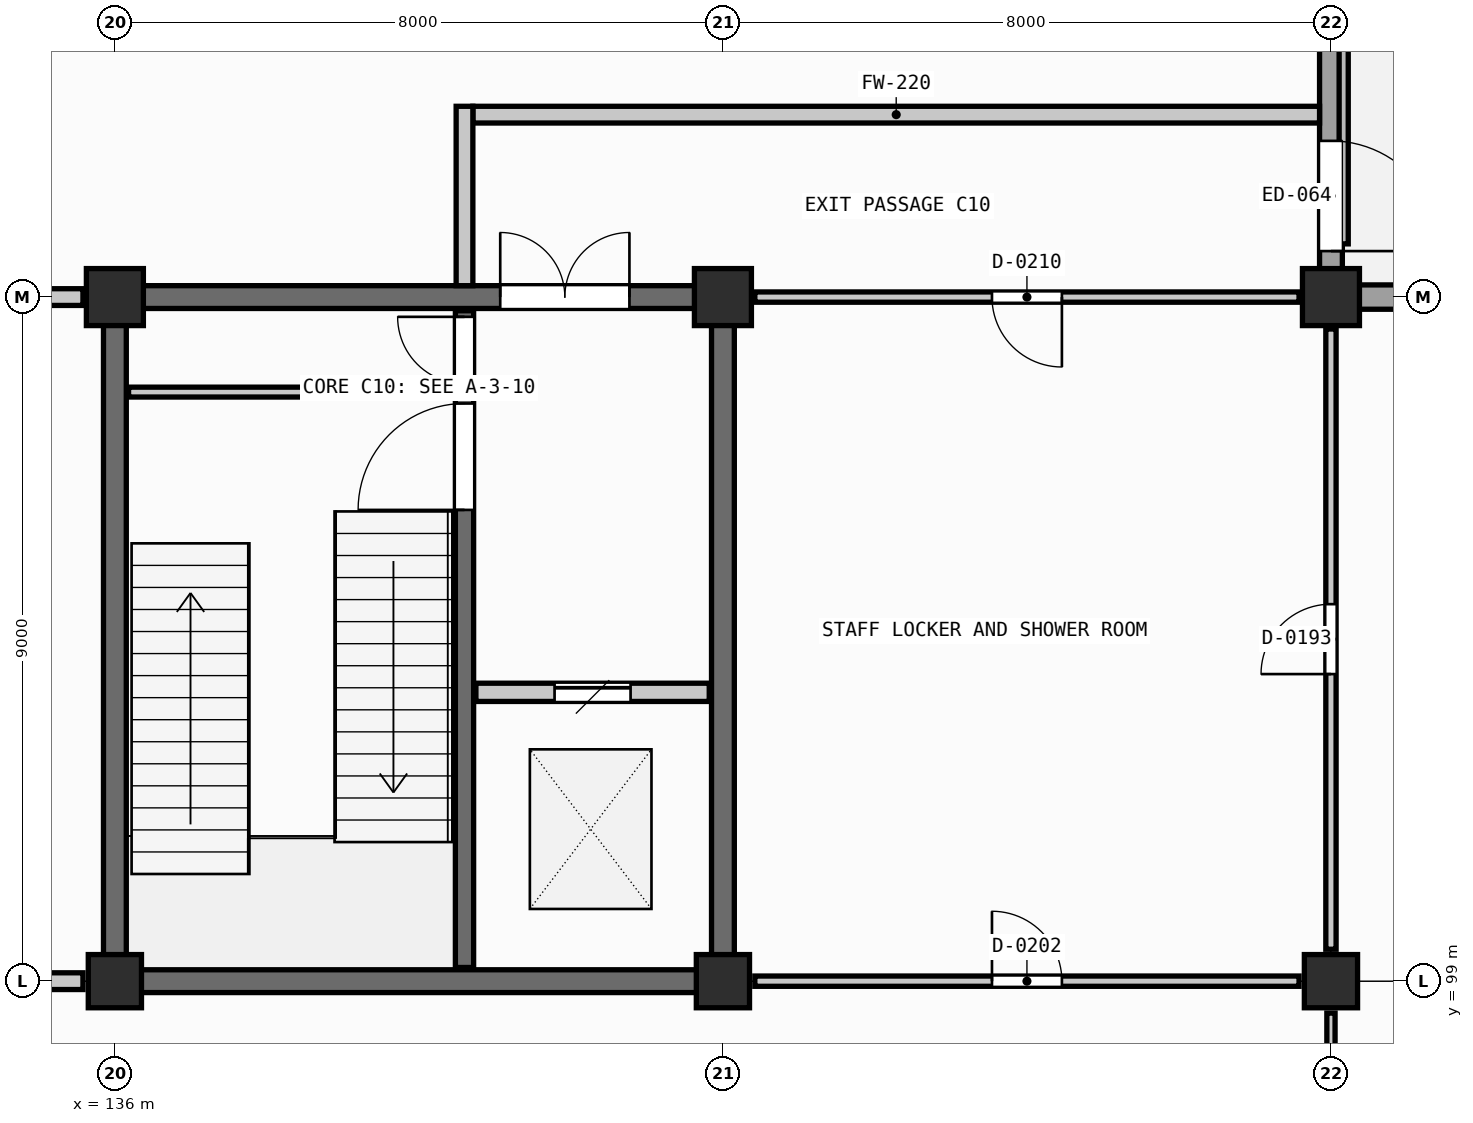
"""IFC4 building model, lengths in metres.
Left out: names, types, materials, properties, quantities, classifications, styles, units other than length and angle.
Written with IfcOpenShell. Run it as: python <this file> out.ifc"""

import sys

from ifc_helpers import new_model, si_unit, direction, frame, frame_2d, origin, origin_2d, place, context, subcontext, project, spatial, rectangle, extrude, element, fill, save


model = new_model("IFC4")
c1 = context("Model", 3, precision=1e-05, world=origin(), true_north=direction((0.0, 1.0)))
c2 = subcontext(c1, "Body", "Model", "MODEL_VIEW")
j1 = project(units=[si_unit("LENGTHUNIT", "METRE"), si_unit("PLANEANGLEUNIT", "RADIAN")], contexts=[c1])
p1 = place(None, origin())
s1 = spatial("IfcSite", under=j1, at=p1, CompositionType="ELEMENT")
p2 = place(p1, origin())
s2 = spatial("IfcBuilding", under=s1, at=p2, CompositionType="ELEMENT")
p3 = place(p2, origin())
s3 = spatial("IfcBuildingStorey", under=s2, at=p3, CompositionType="ELEMENT", Elevation=0.0)
p4 = place(p3, frame((136.0, 99.0, -1.25), z_axis=(0.0, 0.0, 1.0), x_axis=(1.0, 0.0, 0.0)))
e1 = element("IfcColumn", 1, at=p4, inside=s3, PredefinedType="COLUMN", context=c2, shape_type="SweptSolid", body=[
    extrude(rectangle(XDim=0.7, YDim=0.7, at=origin_2d()), origin(), (0.0, 0.0, 1.0), 6.05),
])
p5 = place(p3, frame((136.0, 108.0, -1.25), z_axis=(0.0, 0.0, 1.0), x_axis=(1.0, 0.0, 0.0)))
e2 = element("IfcColumn", 2, at=p5, inside=s3, PredefinedType="COLUMN", context=c2, shape_type="SweptSolid", body=[
    extrude(rectangle(XDim=0.75, YDim=0.75, at=origin_2d()), origin(), (0.0, 0.0, 1.0), 6.05),
])
p6 = place(p3, frame((144.0, 99.0, -1.25), z_axis=(0.0, 0.0, 1.0), x_axis=(1.0, 0.0, 0.0)))
e3 = element("IfcColumn", 3, at=p6, inside=s3, PredefinedType="COLUMN", context=c2, shape_type="SweptSolid", body=[
    extrude(rectangle(XDim=0.7, YDim=0.7, at=origin_2d()), origin(), (0.0, 0.0, 1.0), 6.05),
])
p7 = place(p3, frame((144.0, 108.0, -1.25), z_axis=(0.0, 0.0, 1.0), x_axis=(1.0, 0.0, 0.0)))
e4 = element("IfcColumn", 4, at=p7, inside=s3, PredefinedType="COLUMN", context=c2, shape_type="SweptSolid", body=[
    extrude(rectangle(XDim=0.75, YDim=0.75, at=origin_2d()), origin(), (0.0, 0.0, 1.0), 6.05),
])
p8 = place(p3, frame((152.0, 99.0, -1.25), z_axis=(0.0, 0.0, 1.0), x_axis=(1.0, 0.0, 0.0)))
e5 = element("IfcColumn", 5, at=p8, inside=s3, PredefinedType="COLUMN", context=c2, shape_type="SweptSolid", body=[
    extrude(rectangle(XDim=0.7, YDim=0.7, at=origin_2d()), origin(), (0.0, 0.0, 1.0), 6.05),
])
p9 = place(p3, frame((152.0, 108.0, -1.25), z_axis=(0.0, 0.0, 1.0), x_axis=(1.0, 0.0, 0.0)))
e6 = element("IfcColumn", 6, at=p9, inside=s3, PredefinedType="COLUMN", context=c2, shape_type="SweptSolid", body=[
    extrude(rectangle(XDim=0.75, YDim=0.75, at=origin_2d()), origin(), (0.0, 0.0, 1.0), 6.05),
])
p10 = place(p3, frame((159.655, 108.0, 0.0), z_axis=(0.0, 0.0, 1.0), x_axis=(-1.0, 0.0, 0.0)))
e7 = element("IfcWall", 7, at=p10, inside=s3, PredefinedType="SOLIDWALL", context=c2, shape_type="SweptSolid", body=[
    extrude(rectangle(XDim=7.285, YDim=0.32, at=frame_2d((3.643, 0.0))), origin(), (0.0, 0.0, 1.0), 3.65),
])
p11 = place(p10, frame((2.542, 0.0, 0.0)))
e8 = element("IfcOpeningElement", 8, at=p11, cuts=e7, PredefinedType="OPENING", context=c2, shape_type="SweptSolid", body=[
    extrude(rectangle(XDim=2.2, YDim=2.3, at=frame_2d((1.1, 1.15))), frame((0.0, 0.17, 0.0), z_axis=(0.0, -1.0, 0.0), x_axis=(1.0, 0.0, 0.0)), (0.0, 0.0, 1.0), 0.34),
])
p12 = place(p3, frame((152.0, 108.37, 0.0), z_axis=(0.0, 0.0, 1.0), x_axis=(0.0, 1.0, 0.0)))
e9 = element("IfcWall", 9, at=p12, inside=s3, PredefinedType="SOLIDWALL", context=c2, shape_type="SweptSolid", body=[
    extrude(rectangle(XDim=8.285, YDim=0.3, at=frame_2d((4.143, 0.0))), origin(), (0.0, 0.0, 1.0), 3.65),
])
p13 = place(p12, frame((3.417, 0.0, 0.0)))
e10 = element("IfcOpeningElement", 10, at=p13, cuts=e9, PredefinedType="OPENING", context=c2, shape_type="SweptSolid", body=[
    extrude(rectangle(XDim=1.45, YDim=2.2, at=frame_2d((0.725, 1.1))), frame((0.0, 0.16, 0.0), z_axis=(0.0, -1.0, 0.0), x_axis=(1.0, 0.0, 0.0)), (0.0, 0.0, 1.0), 0.32),
])
p14 = place(p12, frame((0.235, 0.0, 0.0)))
e11 = element("IfcOpeningElement", 11, at=p14, cuts=e9, PredefinedType="OPENING", context=c2, shape_type="SweptSolid", body=[
    extrude(rectangle(XDim=1.45, YDim=2.2, at=frame_2d((0.725, 1.1))), frame((0.0, 0.16, 0.0), z_axis=(0.0, -1.0, 0.0), x_axis=(1.0, 0.0, 0.0)), (0.0, 0.0, 1.0), 0.32),
])
p15 = place(p3, frame((136.345, 99.0, -1.25), z_axis=(0.0, 0.0, 1.0), x_axis=(1.0, 0.0, 0.0)))
e12 = element("IfcWall", 12, at=p15, inside=s3, PredefinedType="SHEAR", context=c2, shape_type="SweptSolid", body=[
    extrude(rectangle(XDim=7.31, YDim=0.3, at=frame_2d((3.655, 0.0))), origin(), (0.0, 0.0, 1.0), 5.805),
])
p16 = place(p3, frame((136.37, 108.0, -1.25), z_axis=(0.0, 0.0, 1.0), x_axis=(1.0, 0.0, 0.0)))
e13 = element("IfcWall", 13, at=p16, inside=s3, PredefinedType="SHEAR", context=c2, shape_type="SweptSolid", body=[
    extrude(rectangle(XDim=7.26, YDim=0.3, at=frame_2d((3.63, 0.0))), origin(), (0.0, 0.0, 1.0), 5.805),
])
p17 = place(p16, frame((4.7, 0.0, 1.25)))
e14 = element("IfcOpeningElement", 14, at=p17, cuts=e13, PredefinedType="OPENING", context=c2, shape_type="SweptSolid", body=[
    extrude(rectangle(XDim=1.7, YDim=2.25, at=frame_2d((0.85, 1.125))), frame((0.0, 0.16, 0.0), z_axis=(0.0, -1.0, 0.0), x_axis=(1.0, 0.0, 0.0)), (0.0, 0.0, 1.0), 0.32),
])
for number, where, z_axis, x_axis in (
    (15, (136.0, 99.345, -1.25), (0.0, 0.0, 1.0), (0.0, 1.0, 0.0)),
    (16, (144.0, 99.345, -1.25), (0.0, 0.0, 1.0), (0.0, 1.0, 0.0)),
):
    element("IfcWall", number, at=place(p3, frame(where, z_axis=z_axis, x_axis=x_axis)), inside=s3, PredefinedType="SHEAR", context=c2, shape_type="SweptSolid", body=[
        extrude(rectangle(XDim=8.285, YDim=0.3, at=frame_2d((4.143, 0.0))), origin(), (0.0, 0.0, 1.0), 5.805),
    ])
p18 = place(p3, frame((140.6, 99.18, -1.25), z_axis=(0.0, 0.0, 1.0), x_axis=(0.0, 1.0, 0.0)))
e17 = element("IfcWall", 17, at=p18, inside=s3, PredefinedType="SHEAR", context=c2, shape_type="SweptSolid", body=[
    extrude(rectangle(XDim=8.64, YDim=0.24, at=frame_2d((4.32, 0.0))), origin(), (0.0, 0.0, 1.0), 5.805),
])
p19 = place(p18, frame((6.02, 0.0, 1.25)))
e18 = element("IfcOpeningElement", 18, at=p19, cuts=e17, PredefinedType="OPENING", context=c2, shape_type="SweptSolid", body=[
    extrude(rectangle(XDim=1.4, YDim=2.2, at=frame_2d((0.7, 1.1))), frame((0.0, 0.13, 0.0), z_axis=(0.0, -1.0, 0.0), x_axis=(1.0, 0.0, 0.0)), (0.0, 0.0, 1.0), 0.26),
])
p20 = place(p18, frame((7.68, 0.0, 1.25)))
e19 = element("IfcOpeningElement", 19, at=p20, cuts=e17, PredefinedType="OPENING", context=c2, shape_type="SweptSolid", body=[
    extrude(rectangle(XDim=0.88, YDim=2.02, at=frame_2d((0.44, 1.01))), frame((0.0, 0.13, 0.0), z_axis=(0.0, -1.0, 0.0), x_axis=(1.0, 0.0, 0.0)), (0.0, 0.0, 1.0), 0.26),
])
p21 = place(p3, frame((136.18, 106.75, 0.0), z_axis=(0.0, 0.0, 1.0), x_axis=(1.0, 0.0, 0.0)))
e20 = element("IfcWall", 20, at=p21, inside=s3, PredefinedType="PARTITIONING", context=c2, shape_type="SweptSolid", body=[
    extrude(rectangle(XDim=4.28, YDim=0.13, at=frame_2d((2.14, 0.0))), origin(), (0.0, 0.0, 1.0), 3.905),
])
p22 = place(p3, frame((140.75, 102.8, 0.0), z_axis=(0.0, 0.0, 1.0), x_axis=(1.0, 0.0, 0.0)))
e21 = element("IfcWall", 21, at=p22, inside=s3, PredefinedType="SHEAR", context=c2, shape_type="SweptSolid", body=[
    extrude(rectangle(XDim=3.07, YDim=0.24, at=frame_2d((1.535, 0.0))), origin(), (0.0, 0.0, 1.0), 3.905),
])
p23 = place(p22, frame((1.035, 0.0, 0.0)))
e22 = element("IfcOpeningElement", 22, at=p23, cuts=e21, PredefinedType="OPENING", context=c2, shape_type="SweptSolid", body=[
    extrude(rectangle(XDim=1.0, YDim=2.15, at=frame_2d((0.5, 1.075))), frame((0.0, 0.13, 0.0), z_axis=(0.0, -1.0, 0.0), x_axis=(1.0, 0.0, 0.0)), (0.0, 0.0, 1.0), 0.26),
])
p24 = place(p3, frame((152.0, 90.42, 0.0), z_axis=(0.0, 0.0, 1.0), x_axis=(0.0, 1.0, 0.0)))
e23 = element("IfcWall", 23, at=p24, inside=s3, PredefinedType="PARTITIONING", context=c2, shape_type="SweptSolid", body=[
    extrude(rectangle(XDim=8.16, YDim=0.108, at=frame_2d((4.08, 0.0))), origin(), (0.0, 0.0, 1.0), 3.65),
])
p25 = place(p24, frame((3.005, 0.0, 0.0)))
e24 = element("IfcOpeningElement", 24, at=p25, cuts=e23, PredefinedType="OPENING", context=c2, shape_type="SweptSolid", body=[
    extrude(rectangle(XDim=2.15, YDim=2.35, at=frame_2d((1.075, 1.175))), frame((0.0, 0.064, 0.0), z_axis=(0.0, -1.0, 0.0), x_axis=(1.0, 0.0, 0.0)), (0.0, 0.0, 1.0), 0.128),
])
p26 = place(p3, frame((152.0, 99.42, 0.0), z_axis=(0.0, 0.0, 1.0), x_axis=(0.0, 1.0, 0.0)))
e25 = element("IfcWall", 25, at=p26, inside=s3, PredefinedType="PLUMBINGWALL", context=c2, shape_type="SweptSolid", body=[
    extrude(rectangle(XDim=8.16, YDim=0.135, at=frame_2d((4.08, 0.0))), origin(), (0.0, 0.0, 1.0), 3.65),
])
p27 = place(p26, frame((3.62, 0.0, 0.0)))
e26 = element("IfcOpeningElement", 26, at=p27, cuts=e25, PredefinedType="OPENING", context=c2, shape_type="SweptSolid", body=[
    extrude(rectangle(XDim=0.92, YDim=2.08, at=frame_2d((0.46, 1.04))), frame((0.0, 0.078, 0.0), z_axis=(0.0, -1.0, 0.0), x_axis=(1.0, 0.0, 0.0)), (0.0, 0.0, 1.0), 0.155),
])
p28 = place(p3, frame((128.82, 99.0, 0.0), z_axis=(0.0, 0.0, 1.0), x_axis=(1.0, 0.0, 0.0)))
e27 = element("IfcWall", 27, at=p28, inside=s3, PredefinedType="SOLIDWALL", context=c2, shape_type="SweptSolid", body=[
    extrude(rectangle(XDim=6.76, YDim=0.22, at=frame_2d((3.38, 0.0))), origin(), (0.0, 0.0, 1.0), 3.65),
])
p29 = place(p28, frame((2.63, 0.0, 0.0)))
e28 = element("IfcOpeningElement", 28, at=p29, cuts=e27, PredefinedType="OPENING", context=c2, shape_type="SweptSolid", body=[
    extrude(rectangle(XDim=1.5, YDim=2.25, at=frame_2d((0.75, 1.125))), frame((0.0, 0.12, 0.0), z_axis=(0.0, -1.0, 0.0), x_axis=(1.0, 0.0, 0.0)), (0.0, 0.0, 1.0), 0.24),
])
p30 = place(p3, frame((144.42, 99.0, 0.0), z_axis=(0.0, 0.0, 1.0), x_axis=(1.0, 0.0, 0.0)))
e29 = element("IfcWall", 29, at=p30, inside=s3, PredefinedType="PLUMBINGWALL", context=c2, shape_type="SweptSolid", body=[
    extrude(rectangle(XDim=7.16, YDim=0.135, at=frame_2d((3.58, 0.0))), origin(), (0.0, 0.0, 1.0), 3.65),
])
p31 = place(p30, frame((3.12, 0.0, 0.0)))
e30 = element("IfcOpeningElement", 30, at=p31, cuts=e29, PredefinedType="OPENING", context=c2, shape_type="SweptSolid", body=[
    extrude(rectangle(XDim=0.92, YDim=2.08, at=frame_2d((0.46, 1.04))), frame((0.0, 0.078, 0.0), z_axis=(0.0, -1.0, 0.0), x_axis=(1.0, 0.0, 0.0)), (0.0, 0.0, 1.0), 0.155),
])
p32 = place(p3, frame((128.82, 108.0, 0.0), z_axis=(0.0, 0.0, 1.0), x_axis=(1.0, 0.0, 0.0)))
e31 = element("IfcWall", 31, at=p32, inside=s3, PredefinedType="SOLIDWALL", context=c2, shape_type="SweptSolid", body=[
    extrude(rectangle(XDim=6.76, YDim=0.22, at=frame_2d((3.38, 0.0))), origin(), (0.0, 0.0, 1.0), 3.65),
])
p33 = place(p32, frame((2.58, 0.0, 0.0)))
e32 = element("IfcOpeningElement", 32, at=p33, cuts=e31, PredefinedType="OPENING", context=c2, shape_type="SweptSolid", body=[
    extrude(rectangle(XDim=1.6, YDim=2.28, at=frame_2d((0.8, 1.14))), frame((0.0, 0.12, 0.0), z_axis=(0.0, -1.0, 0.0), x_axis=(1.0, 0.0, 0.0)), (0.0, 0.0, 1.0), 0.24),
])
p34 = place(p3, frame((144.42, 108.0, 0.0), z_axis=(0.0, 0.0, 1.0), x_axis=(1.0, 0.0, 0.0)))
e33 = element("IfcWall", 33, at=p34, inside=s3, PredefinedType="PLUMBINGWALL", context=c2, shape_type="SweptSolid", body=[
    extrude(rectangle(XDim=7.16, YDim=0.135, at=frame_2d((3.58, 0.0))), origin(), (0.0, 0.0, 1.0), 3.65),
])
p35 = place(p34, frame((3.12, 0.0, 0.0)))
e34 = element("IfcOpeningElement", 34, at=p35, cuts=e33, PredefinedType="OPENING", context=c2, shape_type="SweptSolid", body=[
    extrude(rectangle(XDim=0.92, YDim=2.08, at=frame_2d((0.46, 1.04))), frame((0.0, 0.078, 0.0), z_axis=(0.0, -1.0, 0.0), x_axis=(1.0, 0.0, 0.0)), (0.0, 0.0, 1.0), 0.155),
])
p36 = place(p3, frame((140.71, 110.4, 0.0), z_axis=(0.0, 0.0, 1.0), x_axis=(1.0, 0.0, 0.0)))
e35 = element("IfcWall", 35, at=p36, inside=s3, PredefinedType="SOLIDWALL", context=c2, shape_type="SweptSolid", body=[
    extrude(rectangle(XDim=11.14, YDim=0.22, at=frame_2d((5.57, 0.0))), origin(), (0.0, 0.0, 1.0), 3.65),
])
p37 = place(p3, frame((140.6, 108.15, 0.0), z_axis=(0.0, 0.0, 1.0), x_axis=(0.0, 1.0, 0.0)))
e36 = element("IfcWall", 36, at=p37, inside=s3, PredefinedType="SOLIDWALL", context=c2, shape_type="SweptSolid", body=[
    extrude(rectangle(XDim=2.36, YDim=0.22, at=frame_2d((1.18, 0.0))), origin(), (0.0, 0.0, 1.0), 3.65),
])
p38 = place(p19, origin())
e37 = element("IfcDoor", 37, at=p38, inside=s3, OperationType="SINGLE_SWING_LEFT", PredefinedType="DOOR", context=c2, shape_type="SweptSolid", body=[
    extrude(rectangle(XDim=1.4, YDim=2.2, at=frame_2d((0.7, 1.1))), frame((0.0, 0.025, 0.0), z_axis=(0.0, -1.0, 0.0), x_axis=(1.0, 0.0, 0.0)), (0.0, 0.0, 1.0), 0.05),
])
fill(e18, e37)
p39 = place(p20, origin())
e38 = element("IfcDoor", 38, at=p39, inside=s3, OperationType="SINGLE_SWING_RIGHT", PredefinedType="DOOR", context=c2, shape_type="SweptSolid", body=[
    extrude(rectangle(XDim=0.88, YDim=2.02, at=frame_2d((0.44, 1.01))), frame((0.0, 0.025, 0.0), z_axis=(0.0, -1.0, 0.0), x_axis=(1.0, 0.0, 0.0)), (0.0, 0.0, 1.0), 0.05),
])
fill(e19, e38)
p40 = place(p17, origin())
e39 = element("IfcDoor", 39, at=p40, inside=s3, OperationType="DOUBLE_DOOR_SINGLE_SWING", PredefinedType="DOOR", context=c2, shape_type="SweptSolid", body=[
    extrude(rectangle(XDim=1.7, YDim=2.25, at=frame_2d((0.85, 1.125))), frame((0.0, 0.025, 0.0), z_axis=(0.0, -1.0, 0.0), x_axis=(1.0, 0.0, 0.0)), (0.0, 0.0, 1.0), 0.05),
])
fill(e14, e39)
p41 = place(p23, origin())
e40 = element("IfcDoor", 40, at=p41, inside=s3, OperationType="SLIDING_TO_LEFT", PredefinedType="DOOR", context=c2, shape_type="SweptSolid", body=[
    extrude(rectangle(XDim=1.0, YDim=2.15, at=frame_2d((0.5, 1.075))), frame((0.0, 0.025, 0.0), z_axis=(0.0, -1.0, 0.0), x_axis=(1.0, 0.0, 0.0)), (0.0, 0.0, 1.0), 0.05),
])
fill(e22, e40)
p42 = place(p27, origin())
e41 = element("IfcDoor", 41, at=p42, inside=s3, OperationType="SINGLE_SWING_LEFT", PredefinedType="DOOR", context=c2, shape_type="SweptSolid", body=[
    extrude(rectangle(XDim=0.92, YDim=2.08, at=frame_2d((0.46, 1.04))), frame((0.0, 0.025, 0.0), z_axis=(0.0, -1.0, 0.0), x_axis=(1.0, 0.0, 0.0)), (0.0, 0.0, 1.0), 0.05),
])
fill(e26, e41)
p43 = place(p31, origin())
e42 = element("IfcDoor", 42, at=p43, inside=s3, OperationType="SINGLE_SWING_LEFT", PredefinedType="DOOR", context=c2, shape_type="SweptSolid", body=[
    extrude(rectangle(XDim=0.92, YDim=2.08, at=frame_2d((0.46, 1.04))), frame((0.0, 0.025, 0.0), z_axis=(0.0, -1.0, 0.0), x_axis=(1.0, 0.0, 0.0)), (0.0, 0.0, 1.0), 0.05),
])
fill(e30, e42)
p44 = place(p35, frame((0.92, 0.0, 0.0), z_axis=(0.0, 0.0, 1.0), x_axis=(-1.0, 0.0, 0.0)))
e43 = element("IfcDoor", 43, at=p44, inside=s3, OperationType="SINGLE_SWING_RIGHT", PredefinedType="DOOR", context=c2, shape_type="SweptSolid", body=[
    extrude(rectangle(XDim=0.92, YDim=2.08, at=frame_2d((0.46, 1.04))), frame((0.0, 0.025, 0.0), z_axis=(0.0, -1.0, 0.0), x_axis=(1.0, 0.0, 0.0)), (0.0, 0.0, 1.0), 0.05),
])
fill(e34, e43)
p45 = place(p14, frame((1.45, 0.0, 0.0), z_axis=(0.0, 0.0, 1.0), x_axis=(-1.0, 0.0, 0.0)))
e44 = element("IfcDoor", 44, at=p45, inside=s3, OperationType="SINGLE_SWING_LEFT", PredefinedType="DOOR", context=c2, shape_type="SweptSolid", body=[
    extrude(rectangle(XDim=1.45, YDim=2.2, at=frame_2d((0.725, 1.1))), frame((0.0, 0.025, 0.0), z_axis=(0.0, -1.0, 0.0), x_axis=(1.0, 0.0, 0.0)), (0.0, 0.0, 1.0), 0.05),
])
fill(e11, e44)
save(model, sys.argv[1])
